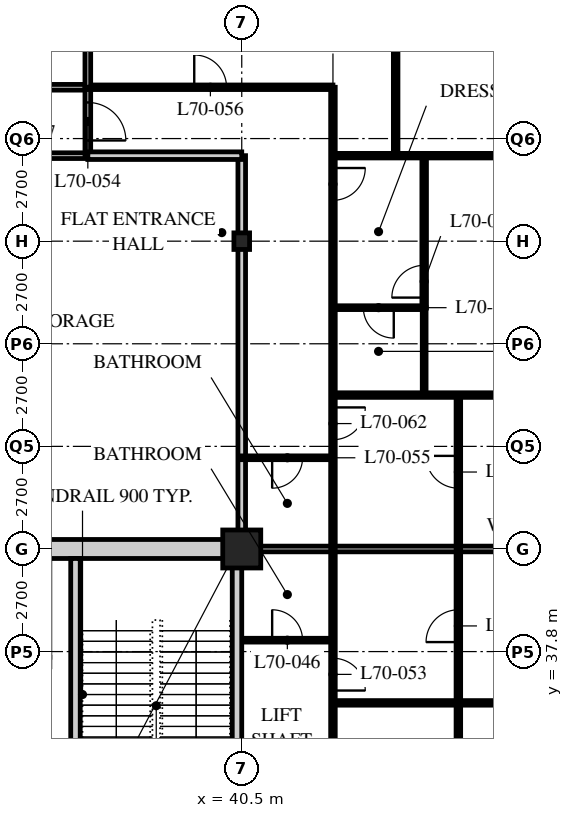
"""IFC4 building model, lengths in metres.
Left out: names, types, materials, properties, quantities, classifications, styles, units other than length and angle.
Written with IfcOpenShell. Run it as: python <this file> out.ifc"""

import sys

from ifc_helpers import new_model, si_unit, direction, frame, frame_2d, origin, origin_2d, place, context, subcontext, project, spatial, rectangle, hollow_rectangle, i_section, extrude, element, fill, save


model = new_model("IFC4")
c1 = context("Model", 3, precision=1e-05, world=origin(), true_north=direction((0.0, 1.0)))
c2 = subcontext(c1, "Body", "Model", "MODEL_VIEW")
j1 = project(units=[si_unit("LENGTHUNIT", "METRE"), si_unit("PLANEANGLEUNIT", "RADIAN")], contexts=[c1])
p1 = place(None, origin())
s1 = spatial("IfcSite", under=j1, at=p1, CompositionType="ELEMENT")
p2 = place(p1, origin())
s2 = spatial("IfcBuilding", under=s1, at=p2, CompositionType="ELEMENT")
p3 = place(p2, frame((0.0, 0.0, 273.6)))
s3 = spatial("IfcBuildingStorey", under=s2, at=p3, CompositionType="ELEMENT", Elevation=273.6)
p4 = place(p3, frame((40.5, 40.5, 0.0), z_axis=(0.0, 0.0, 1.0), x_axis=(1.0, 0.0, 0.0)))
e1 = element("IfcColumn", 1, at=p4, inside=s3, PredefinedType="COLUMN", context=c2, shape_type="SweptSolid", body=[
    extrude(hollow_rectangle(XDim=1.0, YDim=1.0, WallThickness=0.1, at=origin_2d()), origin(), (0.0, 0.0, 1.0), 3.9),
])
p5 = place(p3, frame((40.5, 48.6, 0.0), z_axis=(0.0, 0.0, 1.0), x_axis=(1.0, 0.0, 0.0)))
e2 = element("IfcColumn", 2, at=p5, inside=s3, PredefinedType="COLUMN", context=c2, shape_type="SweptSolid", body=[
    extrude(i_section(OverallWidth=0.412, OverallDepth=0.437, WebThickness=0.036, FlangeThickness=0.058, FilletRadius=0.015, at=origin_2d()), origin(), (0.0, 0.0, 1.0), 3.9),
])
p6 = place(p3, frame((12.15, 52.65, 0.0), z_axis=(0.0, 0.0, 1.0), x_axis=(1.0, 0.0, 0.0)))
e3 = element("IfcWall", 3, at=p6, inside=s3, PredefinedType="PARTITIONING", context=c2, shape_type="SweptSolid", body=[
    extrude(rectangle(XDim=24.3, YDim=0.15, at=frame_2d((12.15, 0.0))), origin(), (0.0, 0.0, 1.0), 3.69),
])
p7 = place(p6, frame((6.4, 0.0, 0.0)))
e4 = element("IfcOpeningElement", 4, at=p7, cuts=e3, PredefinedType="OPENING", context=c2, shape_type="SweptSolid", body=[
    extrude(rectangle(XDim=1.0, YDim=2.1, at=frame_2d((0.5, 1.05))), frame((0.0, 0.085, 0.0), z_axis=(0.0, -1.0, 0.0), x_axis=(1.0, 0.0, 0.0)), (0.0, 0.0, 1.0), 0.17),
])
p8 = place(p6, frame((8.5, 0.0, 0.0)))
e5 = element("IfcOpeningElement", 5, at=p8, cuts=e3, PredefinedType="OPENING", context=c2, shape_type="SweptSolid", body=[
    extrude(rectangle(XDim=1.0, YDim=2.1, at=frame_2d((0.5, 1.05))), frame((0.0, 0.085, 0.0), z_axis=(0.0, -1.0, 0.0), x_axis=(1.0, 0.0, 0.0)), (0.0, 0.0, 1.0), 0.17),
])
p9 = place(p6, frame((16.6, 0.0, 0.0)))
e6 = element("IfcOpeningElement", 6, at=p9, cuts=e3, PredefinedType="OPENING", context=c2, shape_type="SweptSolid", body=[
    extrude(rectangle(XDim=1.0, YDim=2.1, at=frame_2d((0.5, 1.05))), frame((0.0, 0.085, 0.0), z_axis=(0.0, -1.0, 0.0), x_axis=(1.0, 0.0, 0.0)), (0.0, 0.0, 1.0), 0.17),
])
p10 = place(p6, frame((1.525, 0.0, 0.0)))
e7 = element("IfcOpeningElement", 7, at=p10, cuts=e3, PredefinedType="OPENING", context=c2, shape_type="SweptSolid", body=[
    extrude(rectangle(XDim=1.0, YDim=2.1, at=frame_2d((0.5, 1.05))), frame((0.0, 0.085, 0.0), z_axis=(0.0, -1.0, 0.0), x_axis=(1.0, 0.0, 0.0)), (0.0, 0.0, 1.0), 0.17),
])
p11 = place(p3, frame((29.56, 50.85, 0.0), z_axis=(0.0, 0.0, 1.0), x_axis=(1.0, 0.0, 0.0)))
e8 = element("IfcWall", 8, at=p11, inside=s3, PredefinedType="PARTITIONING", context=c2, shape_type="SweptSolid", body=[
    extrude(rectangle(XDim=6.89, YDim=0.15, at=frame_2d((3.445, 0.0))), origin(), (0.0, 0.0, 1.0), 3.69),
])
p12 = place(p11, frame((1.49, 0.0, 0.0)))
e9 = element("IfcOpeningElement", 9, at=p12, cuts=e8, PredefinedType="OPENING", context=c2, shape_type="SweptSolid", body=[
    extrude(rectangle(XDim=1.0, YDim=2.1, at=frame_2d((0.5, 1.05))), frame((0.0, 0.085, 0.0), z_axis=(0.0, -1.0, 0.0), x_axis=(1.0, 0.0, 0.0)), (0.0, 0.0, 1.0), 0.17),
])
p13 = place(p11, frame((4.69, 0.0, 0.0)))
e10 = element("IfcOpeningElement", 10, at=p13, cuts=e8, PredefinedType="OPENING", context=c2, shape_type="SweptSolid", body=[
    extrude(rectangle(XDim=1.0, YDim=2.1, at=frame_2d((0.5, 1.05))), frame((0.0, 0.085, 0.0), z_axis=(0.0, -1.0, 0.0), x_axis=(1.0, 0.0, 0.0)), (0.0, 0.0, 1.0), 0.17),
])
p14 = place(p3, frame((36.45, 50.85, 0.0), z_axis=(0.0, 0.0, 1.0), x_axis=(0.0, 1.0, 0.0)))
e11 = element("IfcWall", 11, at=p14, inside=s3, PredefinedType="PARTITIONING", context=c2, shape_type="SweptSolid", body=[
    extrude(rectangle(XDim=1.8, YDim=0.15, at=frame_2d((0.9, 0.0))), origin(), (0.0, 0.0, 1.0), 3.69),
])
p15 = place(p14, frame((0.4, 0.0, 0.0)))
e12 = element("IfcOpeningElement", 12, at=p15, cuts=e11, PredefinedType="OPENING", context=c2, shape_type="SweptSolid", body=[
    extrude(rectangle(XDim=1.0, YDim=2.1, at=frame_2d((0.5, 1.05))), frame((0.0, 0.085, 0.0), z_axis=(0.0, -1.0, 0.0), x_axis=(1.0, 0.0, 0.0)), (0.0, 0.0, 1.0), 0.17),
])
p16 = place(p3, frame((40.5, 40.5, 0.0), z_axis=(0.0, 0.0, 1.0), x_axis=(0.0, 1.0, 0.0)))
e13 = element("IfcWall", 13, at=p16, inside=s3, PredefinedType="SOLIDWALL", context=c2, shape_type="SweptSolid", body=[
    extrude(rectangle(XDim=10.35, YDim=0.2, at=frame_2d((5.175, 0.0))), origin(), (0.0, 0.0, 1.0), 3.078),
])
p17 = place(p3, frame((40.5, 38.1, 0.0), z_axis=(0.0, 0.0, 1.0), x_axis=(1.0, 0.0, 0.0)))
e14 = element("IfcWall", 14, at=p17, inside=s3, PredefinedType="PARTITIONING", context=c2, shape_type="SweptSolid", body=[
    extrude(rectangle(XDim=2.4, YDim=0.1, at=frame_2d((1.2, 0.0))), origin(), (0.0, 0.0, 1.0), 3.69),
])
p18 = place(p17, frame((0.8, 0.0, 0.0)))
e15 = element("IfcOpeningElement", 15, at=p18, cuts=e14, PredefinedType="OPENING", context=c2, shape_type="SweptSolid", body=[
    extrude(rectangle(XDim=0.8, YDim=2.1, at=frame_2d((0.4, 1.05))), frame((0.0, 0.06, 0.0), z_axis=(0.0, -1.0, 0.0), x_axis=(1.0, 0.0, 0.0)), (0.0, 0.0, 1.0), 0.12),
])
p19 = place(p3, frame((42.9, 22.5, 0.0), z_axis=(0.0, 0.0, 1.0), x_axis=(0.0, 1.0, 0.0)))
e16 = element("IfcWall", 16, at=p19, inside=s3, PredefinedType="PARTITIONING", context=c2, shape_type="SweptSolid", body=[
    extrude(rectangle(XDim=18.0, YDim=0.12, at=frame_2d((9.0, 0.0))), origin(), (0.0, 0.0, 1.0), 3.69),
])
p20 = place(p19, frame((2.125, 0.0, 0.0)))
e17 = element("IfcOpeningElement", 17, at=p20, cuts=e16, PredefinedType="OPENING", context=c2, shape_type="SweptSolid", body=[
    extrude(rectangle(XDim=0.85, YDim=2.1, at=frame_2d((0.425, 1.05))), frame((0.0, 0.07, 0.0), z_axis=(0.0, -1.0, 0.0), x_axis=(1.0, 0.0, 0.0)), (0.0, 0.0, 1.0), 0.14),
])
p21 = place(p19, frame((6.175, 0.0, 0.0)))
e18 = element("IfcOpeningElement", 18, at=p21, cuts=e16, PredefinedType="OPENING", context=c2, shape_type="SweptSolid", body=[
    extrude(rectangle(XDim=0.85, YDim=2.1, at=frame_2d((0.425, 1.05))), frame((0.0, 0.07, 0.0), z_axis=(0.0, -1.0, 0.0), x_axis=(1.0, 0.0, 0.0)), (0.0, 0.0, 1.0), 0.14),
])
p22 = place(p19, frame((10.225, 0.0, 0.0)))
e19 = element("IfcOpeningElement", 19, at=p22, cuts=e16, PredefinedType="OPENING", context=c2, shape_type="SweptSolid", body=[
    extrude(rectangle(XDim=0.85, YDim=2.1, at=frame_2d((0.425, 1.05))), frame((0.0, 0.07, 0.0), z_axis=(0.0, -1.0, 0.0), x_axis=(1.0, 0.0, 0.0)), (0.0, 0.0, 1.0), 0.14),
])
p23 = place(p19, frame((14.275, 0.0, 0.0)))
e20 = element("IfcOpeningElement", 20, at=p23, cuts=e16, PredefinedType="OPENING", context=c2, shape_type="SweptSolid", body=[
    extrude(rectangle(XDim=0.85, YDim=2.1, at=frame_2d((0.425, 1.05))), frame((0.0, 0.07, 0.0), z_axis=(0.0, -1.0, 0.0), x_axis=(1.0, 0.0, 0.0)), (0.0, 0.0, 1.0), 0.14),
])
p24 = place(p3, frame((40.5, 40.5, 0.0), z_axis=(0.0, 0.0, 1.0), x_axis=(1.0, 0.0, 0.0)))
e21 = element("IfcWall", 21, at=p24, inside=s3, PredefinedType="PARTITIONING", context=c2, shape_type="SweptSolid", body=[
    extrude(rectangle(XDim=15.9, YDim=0.15, at=frame_2d((7.95, 0.0))), origin(), (0.0, 0.0, 1.0), 3.078),
])
p25 = place(p3, frame((42.9, 36.45, 0.0), z_axis=(0.0, 0.0, 1.0), x_axis=(1.0, 0.0, 0.0)))
e22 = element("IfcWall", 22, at=p25, inside=s3, PredefinedType="PARTITIONING", context=c2, shape_type="SweptSolid", body=[
    extrude(rectangle(XDim=13.5, YDim=0.12, at=frame_2d((6.75, 0.0))), origin(), (0.0, 0.0, 1.0), 3.69),
])
p26 = place(p3, frame((40.5, 42.9, 0.0), z_axis=(0.0, 0.0, 1.0), x_axis=(1.0, 0.0, 0.0)))
e23 = element("IfcWall", 23, at=p26, inside=s3, PredefinedType="PARTITIONING", context=c2, shape_type="SweptSolid", body=[
    extrude(rectangle(XDim=2.4, YDim=0.1, at=frame_2d((1.2, 0.0))), origin(), (0.0, 0.0, 1.0), 3.69),
])
p27 = place(p26, frame((0.8, 0.0, 0.0)))
e24 = element("IfcOpeningElement", 24, at=p27, cuts=e23, PredefinedType="OPENING", context=c2, shape_type="SweptSolid", body=[
    extrude(rectangle(XDim=0.8, YDim=2.1, at=frame_2d((0.4, 1.05))), frame((0.0, 0.06, 0.0), z_axis=(0.0, -1.0, 0.0), x_axis=(1.0, 0.0, 0.0)), (0.0, 0.0, 1.0), 0.12),
])
p28 = place(p3, frame((42.9, 52.65, 0.0), z_axis=(0.0, 0.0, 1.0), x_axis=(0.0, -1.0, 0.0)))
e25 = element("IfcWall", 25, at=p28, inside=s3, PredefinedType="PARTITIONING", context=c2, shape_type="SweptSolid", body=[
    extrude(rectangle(XDim=12.15, YDim=0.12, at=frame_2d((6.075, 0.0))), origin(), (0.0, 0.0, 1.0), 3.69),
])
p29 = place(p28, frame((2.125, 0.0, 0.0)))
e26 = element("IfcOpeningElement", 26, at=p29, cuts=e25, PredefinedType="OPENING", context=c2, shape_type="SweptSolid", body=[
    extrude(rectangle(XDim=0.85, YDim=2.1, at=frame_2d((0.425, 1.05))), frame((0.0, 0.07, 0.0), z_axis=(0.0, -1.0, 0.0), x_axis=(1.0, 0.0, 0.0)), (0.0, 0.0, 1.0), 0.14),
])
p30 = place(p28, frame((8.425, 0.0, 0.0)))
e27 = element("IfcOpeningElement", 27, at=p30, cuts=e25, PredefinedType="OPENING", context=c2, shape_type="SweptSolid", body=[
    extrude(rectangle(XDim=0.85, YDim=2.1, at=frame_2d((0.425, 1.05))), frame((0.0, 0.07, 0.0), z_axis=(0.0, -1.0, 0.0), x_axis=(1.0, 0.0, 0.0)), (0.0, 0.0, 1.0), 0.14),
])
p31 = place(p3, frame((36.45, 52.65, 0.0), z_axis=(0.0, 0.0, 1.0), x_axis=(1.0, 0.0, 0.0)))
e28 = element("IfcWall", 28, at=p31, inside=s3, PredefinedType="PARTITIONING", context=c2, shape_type="SweptSolid", body=[
    extrude(rectangle(XDim=6.45, YDim=0.12, at=frame_2d((3.225, 0.0))), origin(), (0.0, 0.0, 1.0), 3.69),
])
p32 = place(p31, frame((2.8, 0.0, 0.0)))
e29 = element("IfcOpeningElement", 29, at=p32, cuts=e28, PredefinedType="OPENING", context=c2, shape_type="SweptSolid", body=[
    extrude(rectangle(XDim=0.85, YDim=2.1, at=frame_2d((0.425, 1.05))), frame((0.0, 0.07, 0.0), z_axis=(0.0, -1.0, 0.0), x_axis=(1.0, 0.0, 0.0)), (0.0, 0.0, 1.0), 0.14),
])
p33 = place(p3, frame((36.45, 50.85, 0.0), z_axis=(0.0, 0.0, 1.0), x_axis=(1.0, 0.0, 0.0)))
e30 = element("IfcWall", 30, at=p33, inside=s3, PredefinedType="SOLIDWALL", context=c2, shape_type="SweptSolid", body=[
    extrude(rectangle(XDim=4.05, YDim=0.2, at=frame_2d((2.025, 0.0))), origin(), (0.0, 0.0, 1.0), 3.69),
])
p34 = place(p3, frame((42.9, 50.85, 0.0), z_axis=(0.0, 0.0, 1.0), x_axis=(1.0, 0.0, 0.0)))
e31 = element("IfcWall", 31, at=p34, inside=s3, PredefinedType="PARTITIONING", context=c2, shape_type="SweptSolid", body=[
    extrude(rectangle(XDim=13.5, YDim=0.12, at=frame_2d((6.75, 0.0))), origin(), (0.0, 0.0, 1.0), 3.69),
])
p35 = place(p3, frame((36.45, 64.5, 0.0), z_axis=(0.0, 0.0, 1.0), x_axis=(0.0, -1.0, 0.0)))
e32 = element("IfcWall", 32, at=p35, inside=s3, PredefinedType="PARTITIONING", context=c2, shape_type="SweptSolid", body=[
    extrude(rectangle(XDim=11.85, YDim=0.15, at=frame_2d((5.925, 0.0))), origin(), (0.0, 0.0, 1.0), 3.69),
])
p36 = place(p3, frame((44.55, 64.5, 0.0), z_axis=(0.0, 0.0, 1.0), x_axis=(0.0, -1.0, 0.0)))
e33 = element("IfcWall", 33, at=p36, inside=s3, PredefinedType="PARTITIONING", context=c2, shape_type="SweptSolid", body=[
    extrude(rectangle(XDim=13.65, YDim=0.12, at=frame_2d((6.825, 0.0))), origin(), (0.0, 0.0, 1.0), 3.69),
])
p37 = place(p36, frame((8.425, 0.0, 0.0)))
e34 = element("IfcOpeningElement", 34, at=p37, cuts=e33, PredefinedType="OPENING", context=c2, shape_type="SweptSolid", body=[
    extrude(rectangle(XDim=0.85, YDim=2.1, at=frame_2d((0.425, 1.05))), frame((0.0, 0.07, 0.0), z_axis=(0.0, -1.0, 0.0), x_axis=(1.0, 0.0, 0.0)), (0.0, 0.0, 1.0), 0.14),
])
p38 = place(p36, frame((2.5, 0.0, 0.0)))
e35 = element("IfcOpeningElement", 35, at=p38, cuts=e33, PredefinedType="OPENING", context=c2, shape_type="SweptSolid", body=[
    extrude(rectangle(XDim=0.85, YDim=2.1, at=frame_2d((0.425, 1.05))), frame((0.0, 0.07, 0.0), z_axis=(0.0, -1.0, 0.0), x_axis=(1.0, 0.0, 0.0)), (0.0, 0.0, 1.0), 0.14),
])
p39 = place(p3, frame((42.9, 46.85, 0.0), z_axis=(0.0, 0.0, 1.0), x_axis=(1.0, 0.0, 0.0)))
e36 = element("IfcWall", 36, at=p39, inside=s3, PredefinedType="PARTITIONING", context=c2, shape_type="SweptSolid", body=[
    extrude(rectangle(XDim=2.4, YDim=0.1, at=frame_2d((1.2, 0.0))), origin(), (0.0, 0.0, 1.0), 3.69),
])
p40 = place(p39, frame((0.8, 0.0, 0.0)))
e37 = element("IfcOpeningElement", 37, at=p40, cuts=e36, PredefinedType="OPENING", context=c2, shape_type="SweptSolid", body=[
    extrude(rectangle(XDim=0.8, YDim=2.1, at=frame_2d((0.4, 1.05))), frame((0.0, 0.06, 0.0), z_axis=(0.0, -1.0, 0.0), x_axis=(1.0, 0.0, 0.0)), (0.0, 0.0, 1.0), 0.12),
])
p41 = place(p3, frame((45.3, 46.85, 0.0), z_axis=(0.0, 0.0, 1.0), x_axis=(0.0, -1.0, 0.0)))
e38 = element("IfcWall", 38, at=p41, inside=s3, PredefinedType="PARTITIONING", context=c2, shape_type="SweptSolid", body=[
    extrude(rectangle(XDim=2.3, YDim=0.1, at=frame_2d((1.15, 0.0))), origin(), (0.0, 0.0, 1.0), 3.69),
])
p42 = place(p3, frame((42.9, 44.55, 0.0), z_axis=(0.0, 0.0, 1.0), x_axis=(1.0, 0.0, 0.0)))
e39 = element("IfcWall", 39, at=p42, inside=s3, PredefinedType="PARTITIONING", context=c2, shape_type="SweptSolid", body=[
    extrude(rectangle(XDim=13.5, YDim=0.12, at=frame_2d((6.75, 0.0))), origin(), (0.0, 0.0, 1.0), 3.69),
])
p43 = place(p3, frame((45.3, 50.85, 0.0), z_axis=(0.0, 0.0, 1.0), x_axis=(0.0, -1.0, 0.0)))
e40 = element("IfcWall", 40, at=p43, inside=s3, PredefinedType="PARTITIONING", context=c2, shape_type="SweptSolid", body=[
    extrude(rectangle(XDim=4.01, YDim=0.12, at=frame_2d((2.005, 0.0))), origin(), (0.0, 0.0, 1.0), 3.69),
])
p44 = place(p43, frame((2.885, 0.0, 0.0)))
e41 = element("IfcOpeningElement", 41, at=p44, cuts=e40, PredefinedType="OPENING", context=c2, shape_type="SweptSolid", body=[
    extrude(rectangle(XDim=0.85, YDim=2.1, at=frame_2d((0.425, 1.05))), frame((0.0, 0.07, 0.0), z_axis=(0.0, -1.0, 0.0), x_axis=(1.0, 0.0, 0.0)), (0.0, 0.0, 1.0), 0.14),
])
p45 = place(p3, frame((46.2, 28.35, 0.0), z_axis=(0.0, 0.0, 1.0), x_axis=(0.0, 1.0, 0.0)))
e42 = element("IfcWall", 42, at=p45, inside=s3, PredefinedType="PARTITIONING", context=c2, shape_type="SweptSolid", body=[
    extrude(rectangle(XDim=16.2, YDim=0.12, at=frame_2d((8.1, 0.0))), origin(), (0.0, 0.0, 1.0), 3.69),
])
p46 = place(p45, frame((1.6, 0.0, 0.0)))
e43 = element("IfcOpeningElement", 43, at=p46, cuts=e42, PredefinedType="OPENING", context=c2, shape_type="SweptSolid", body=[
    extrude(rectangle(XDim=0.85, YDim=2.1, at=frame_2d((0.425, 1.05))), frame((0.0, 0.07, 0.0), z_axis=(0.0, -1.0, 0.0), x_axis=(1.0, 0.0, 0.0)), (0.0, 0.0, 1.0), 0.14),
])
p47 = place(p45, frame((5.65, 0.0, 0.0)))
e44 = element("IfcOpeningElement", 44, at=p47, cuts=e42, PredefinedType="OPENING", context=c2, shape_type="SweptSolid", body=[
    extrude(rectangle(XDim=0.85, YDim=2.1, at=frame_2d((0.425, 1.05))), frame((0.0, 0.07, 0.0), z_axis=(0.0, -1.0, 0.0), x_axis=(1.0, 0.0, 0.0)), (0.0, 0.0, 1.0), 0.14),
])
p48 = place(p45, frame((9.7, 0.0, 0.0)))
e45 = element("IfcOpeningElement", 45, at=p48, cuts=e42, PredefinedType="OPENING", context=c2, shape_type="SweptSolid", body=[
    extrude(rectangle(XDim=0.85, YDim=2.1, at=frame_2d((0.425, 1.05))), frame((0.0, 0.07, 0.0), z_axis=(0.0, -1.0, 0.0), x_axis=(1.0, 0.0, 0.0)), (0.0, 0.0, 1.0), 0.14),
])
p49 = place(p45, frame((13.75, 0.0, 0.0)))
e46 = element("IfcOpeningElement", 46, at=p49, cuts=e42, PredefinedType="OPENING", context=c2, shape_type="SweptSolid", body=[
    extrude(rectangle(XDim=0.85, YDim=2.1, at=frame_2d((0.425, 1.05))), frame((0.0, 0.07, 0.0), z_axis=(0.0, -1.0, 0.0), x_axis=(1.0, 0.0, 0.0)), (0.0, 0.0, 1.0), 0.14),
])
p50 = place(p3, frame((15.95, 40.5, 0.0), z_axis=(0.0, 0.0, 1.0), x_axis=(1.0, 0.0, 0.0)))
e47 = element("IfcWall", 47, at=p50, inside=s3, PredefinedType="SOLIDWALL", context=c2, shape_type="SweptSolid", body=[
    extrude(rectangle(XDim=24.55, YDim=0.5, at=frame_2d((12.275, 0.0))), origin(), (0.0, 0.0, 1.0), 3.04),
])
p51 = place(p50, frame((11.5, 0.0, 0.0)))
e48 = element("IfcOpeningElement", 48, at=p51, cuts=e47, PredefinedType="OPENING", context=c2, shape_type="SweptSolid", body=[
    extrude(rectangle(XDim=1.8, YDim=2.4, at=frame_2d((0.9, 1.2))), frame((0.0, 0.26, 0.0), z_axis=(0.0, -1.0, 0.0), x_axis=(1.0, 0.0, 0.0)), (0.0, 0.0, 1.0), 0.52),
])
p52 = place(p3, frame((40.375, 24.55, 0.0), z_axis=(0.0, 0.0, 1.0), x_axis=(0.0, 1.0, 0.0)))
e49 = element("IfcWall", 49, at=p52, inside=s3, PredefinedType="SOLIDWALL", context=c2, shape_type="SweptSolid", body=[
    extrude(rectangle(XDim=15.7, YDim=0.25, at=frame_2d((7.85, 0.0))), origin(), (0.0, 0.0, 1.0), 3.078),
])
p53 = place(p3, frame((36.125, 32.5, 0.0), z_axis=(0.0, 0.0, 1.0), x_axis=(0.0, 1.0, 0.0)))
e50 = element("IfcWall", 50, at=p53, inside=s3, PredefinedType="SOLIDWALL", context=c2, shape_type="SweptSolid", body=[
    extrude(rectangle(XDim=7.75, YDim=0.25, at=frame_2d((3.875, 0.0))), origin(), (0.0, 0.0, 1.0), 3.69),
])
p54 = place(p53, frame((0.45, 0.0, 0.0)))
e51 = element("IfcOpeningElement", 51, at=p54, cuts=e50, PredefinedType="OPENING", context=c2, shape_type="SweptSolid", body=[
    extrude(rectangle(XDim=1.2, YDim=2.1, at=frame_2d((0.6, 1.05))), frame((0.0, 0.135, 0.0), z_axis=(0.0, -1.0, 0.0), x_axis=(1.0, 0.0, 0.0)), (0.0, 0.0, 1.0), 0.27),
])
p55 = place(p18, origin())
e52 = element("IfcDoor", 52, at=p55, inside=s3, OperationType="SINGLE_SWING_LEFT", PredefinedType="DOOR", context=c2, shape_type="SweptSolid", body=[
    extrude(rectangle(XDim=0.8, YDim=2.1, at=frame_2d((0.4, 1.05))), frame((0.0, 0.025, 0.0), z_axis=(0.0, -1.0, 0.0), x_axis=(1.0, 0.0, 0.0)), (0.0, 0.0, 1.0), 0.05),
])
fill(e15, e52)
p56 = place(p23, origin())
e53 = element("IfcDoor", 53, at=p56, inside=s3, OperationType="SINGLE_SWING_RIGHT", PredefinedType="DOOR", context=c2, shape_type="SweptSolid", body=[
    extrude(rectangle(XDim=0.85, YDim=2.1, at=frame_2d((0.425, 1.05))), frame((0.0, 0.025, 0.0), z_axis=(0.0, -1.0, 0.0), x_axis=(1.0, 0.0, 0.0)), (0.0, 0.0, 1.0), 0.05),
])
fill(e20, e53)
p57 = place(p15, origin())
e54 = element("IfcDoor", 54, at=p57, inside=s3, OperationType="SINGLE_SWING_RIGHT", PredefinedType="DOOR", context=c2, shape_type="SweptSolid", body=[
    extrude(rectangle(XDim=1.0, YDim=2.1, at=frame_2d((0.5, 1.05))), frame((0.0, 0.025, 0.0), z_axis=(0.0, -1.0, 0.0), x_axis=(1.0, 0.0, 0.0)), (0.0, 0.0, 1.0), 0.05),
])
fill(e12, e54)
p58 = place(p27, origin())
e55 = element("IfcDoor", 55, at=p58, inside=s3, OperationType="SINGLE_SWING_RIGHT", PredefinedType="DOOR", context=c2, shape_type="SweptSolid", body=[
    extrude(rectangle(XDim=0.8, YDim=2.1, at=frame_2d((0.4, 1.05))), frame((0.0, 0.025, 0.0), z_axis=(0.0, -1.0, 0.0), x_axis=(1.0, 0.0, 0.0)), (0.0, 0.0, 1.0), 0.05),
])
fill(e24, e55)
p59 = place(p32, origin())
e56 = element("IfcDoor", 56, at=p59, inside=s3, OperationType="SINGLE_SWING_LEFT", PredefinedType="DOOR", context=c2, shape_type="SweptSolid", body=[
    extrude(rectangle(XDim=0.85, YDim=2.1, at=frame_2d((0.425, 1.05))), frame((0.0, 0.025, 0.0), z_axis=(0.0, -1.0, 0.0), x_axis=(1.0, 0.0, 0.0)), (0.0, 0.0, 1.0), 0.05),
])
fill(e29, e56)
p60 = place(p40, origin())
e57 = element("IfcDoor", 57, at=p60, inside=s3, OperationType="SINGLE_SWING_LEFT", PredefinedType="DOOR", context=c2, shape_type="SweptSolid", body=[
    extrude(rectangle(XDim=0.8, YDim=2.1, at=frame_2d((0.4, 1.05))), frame((0.0, 0.025, 0.0), z_axis=(0.0, -1.0, 0.0), x_axis=(1.0, 0.0, 0.0)), (0.0, 0.0, 1.0), 0.05),
])
fill(e37, e57)
p61 = place(p29, origin())
e58 = element("IfcDoor", 58, at=p61, inside=s3, OperationType="SINGLE_SWING_LEFT", PredefinedType="DOOR", context=c2, shape_type="SweptSolid", body=[
    extrude(rectangle(XDim=0.85, YDim=2.1, at=frame_2d((0.425, 1.05))), frame((0.0, 0.025, 0.0), z_axis=(0.0, -1.0, 0.0), x_axis=(1.0, 0.0, 0.0)), (0.0, 0.0, 1.0), 0.05),
])
fill(e26, e58)
p62 = place(p30, origin())
e59 = element("IfcDoor", 59, at=p62, inside=s3, OperationType="SINGLE_SWING_LEFT", PredefinedType="DOOR", context=c2, shape_type="SweptSolid", body=[
    extrude(rectangle(XDim=0.85, YDim=2.1, at=frame_2d((0.425, 1.05))), frame((0.0, 0.025, 0.0), z_axis=(0.0, -1.0, 0.0), x_axis=(1.0, 0.0, 0.0)), (0.0, 0.0, 1.0), 0.05),
])
fill(e27, e59)
p63 = place(p44, origin())
e60 = element("IfcDoor", 60, at=p63, inside=s3, OperationType="SINGLE_SWING_LEFT", PredefinedType="DOOR", context=c2, shape_type="SweptSolid", body=[
    extrude(rectangle(XDim=0.85, YDim=2.1, at=frame_2d((0.425, 1.05))), frame((0.0, 0.025, 0.0), z_axis=(0.0, -1.0, 0.0), x_axis=(1.0, 0.0, 0.0)), (0.0, 0.0, 1.0), 0.05),
])
fill(e41, e60)
p64 = place(p48, origin())
e61 = element("IfcDoor", 61, at=p64, inside=s3, OperationType="SINGLE_SWING_LEFT", PredefinedType="DOOR", context=c2, shape_type="SweptSolid", body=[
    extrude(rectangle(XDim=0.85, YDim=2.1, at=frame_2d((0.425, 1.05))), frame((0.0, 0.025, 0.0), z_axis=(0.0, -1.0, 0.0), x_axis=(1.0, 0.0, 0.0)), (0.0, 0.0, 1.0), 0.05),
])
fill(e45, e61)
p65 = place(p49, origin())
e62 = element("IfcDoor", 62, at=p65, inside=s3, OperationType="SINGLE_SWING_RIGHT", PredefinedType="DOOR", context=c2, shape_type="SweptSolid", body=[
    extrude(rectangle(XDim=0.85, YDim=2.1, at=frame_2d((0.425, 1.05))), frame((0.0, 0.025, 0.0), z_axis=(0.0, -1.0, 0.0), x_axis=(1.0, 0.0, 0.0)), (0.0, 0.0, 1.0), 0.05),
])
fill(e46, e62)
save(model, sys.argv[1])
